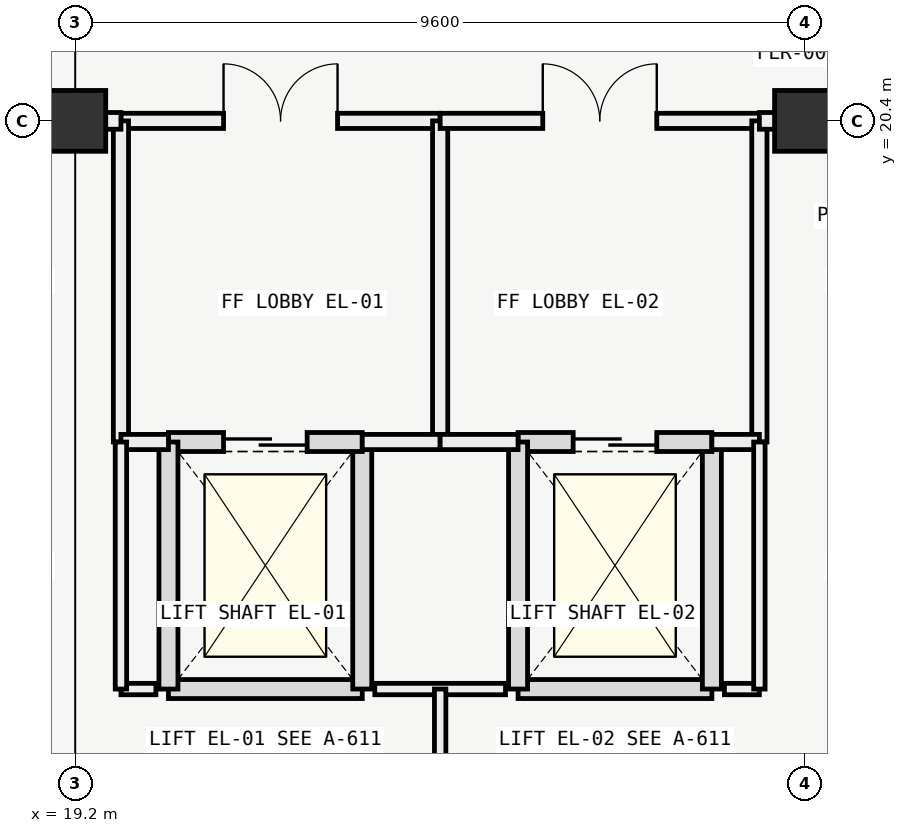
"""IFC4 building model, lengths in metres.
Left out: names, types, materials, properties, quantities, classifications, styles, units other than length and angle.
Written with IfcOpenShell. Run it as: python <this file> out.ifc"""

import sys

from ifc_helpers import new_model, si_unit, direction, frame, frame_2d, origin, origin_2d, place, context, subcontext, project, spatial, rectangle, extrude, element, fill, save


model = new_model("IFC4")
c1 = context("Model", 3, precision=1e-05, world=origin(), true_north=direction((0.0, 1.0)))
c2 = subcontext(c1, "Body", "Model", "MODEL_VIEW")
j1 = project(units=[si_unit("LENGTHUNIT", "METRE"), si_unit("PLANEANGLEUNIT", "RADIAN")], contexts=[c1])
p1 = place(None, origin())
s1 = spatial("IfcSite", under=j1, at=p1, CompositionType="ELEMENT")
p2 = place(p1, origin())
s2 = spatial("IfcBuilding", under=s1, at=p2, CompositionType="ELEMENT")
p3 = place(p2, origin())
s3 = spatial("IfcBuildingStorey", under=s2, at=p3, CompositionType="ELEMENT", Elevation=0.0)
for number, where, z_axis, x_axis in (
    (1, (19.2, 20.4, 0.0), (0.0, 0.0, 1.0), (1.0, 0.0, 0.0)),
    (2, (28.8, 20.4, 0.0), (0.0, 0.0, 1.0), (1.0, 0.0, 0.0)),
):
    element("IfcColumn", number, at=place(p3, frame(where, z_axis=z_axis, x_axis=x_axis)), inside=s3, PredefinedType="COLUMN", context=c2, shape_type="SweptSolid", body=[
        extrude(rectangle(XDim=0.8, YDim=0.8, at=origin_2d()), origin(), (0.0, 0.0, 1.0), 5.4),
    ])
p4 = place(p3, frame((20.425, 12.925, 0.0), z_axis=(0.0, 0.0, 1.0), x_axis=(1.0, 0.0, 0.0)))
e3 = element("IfcWall", 3, at=p4, inside=s3, PredefinedType="SOLIDWALL", context=c2, shape_type="SweptSolid", body=[
    extrude(rectangle(XDim=2.55, YDim=0.25, at=frame_2d((1.275, 0.0))), origin(), (0.0, 0.0, 1.0), 5.12),
])
p5 = place(p3, frame((22.975, 12.925, 0.0), z_axis=(0.0, 0.0, 1.0), x_axis=(0.0, 1.0, 0.0)))
e4 = element("IfcWall", 4, at=p5, inside=s3, PredefinedType="SOLIDWALL", context=c2, shape_type="SweptSolid", body=[
    extrude(rectangle(XDim=3.25, YDim=0.25, at=frame_2d((1.625, 0.0))), origin(), (0.0, 0.0, 1.0), 5.12),
])
p6 = place(p3, frame((22.975, 16.175, 0.0), z_axis=(0.0, 0.0, 1.0), x_axis=(-1.0, 0.0, 0.0)))
e5 = element("IfcWall", 5, at=p6, inside=s3, PredefinedType="SOLIDWALL", context=c2, shape_type="SweptSolid", body=[
    extrude(rectangle(XDim=2.55, YDim=0.25, at=frame_2d((1.275, 0.0))), origin(), (0.0, 0.0, 1.0), 5.12),
])
p7 = place(p6, frame((0.725, 0.0, 0.0)))
e6 = element("IfcOpeningElement", 6, at=p7, cuts=e5, PredefinedType="OPENING", context=c2, shape_type="SweptSolid", body=[
    extrude(rectangle(XDim=1.1, YDim=2.1, at=frame_2d((0.55, 1.05))), frame((0.0, 0.135, 0.0), z_axis=(0.0, -1.0, 0.0), x_axis=(1.0, 0.0, 0.0)), (0.0, 0.0, 1.0), 0.27),
])
p8 = place(p3, frame((20.425, 16.175, 0.0), z_axis=(0.0, 0.0, 1.0), x_axis=(0.0, -1.0, 0.0)))
e7 = element("IfcWall", 7, at=p8, inside=s3, PredefinedType="SOLIDWALL", context=c2, shape_type="SweptSolid", body=[
    extrude(rectangle(XDim=3.25, YDim=0.25, at=frame_2d((1.625, 0.0))), origin(), (0.0, 0.0, 1.0), 5.12),
])
p9 = place(p3, frame((19.8, 20.4, 0.0), z_axis=(0.0, 0.0, 1.0), x_axis=(1.0, 0.0, 0.0)))
e8 = element("IfcWall", 8, at=p9, inside=s3, PredefinedType="PARTITIONING", context=c2, shape_type="SweptSolid", body=[
    extrude(rectangle(XDim=4.2, YDim=0.2, at=frame_2d((2.1, 0.0))), origin(), (0.0, 0.0, 1.0), 4.4),
])
p10 = place(p9, frame((1.35, 0.0, 0.0)))
e9 = element("IfcOpeningElement", 9, at=p10, cuts=e8, PredefinedType="OPENING", context=c2, shape_type="SweptSolid", body=[
    extrude(rectangle(XDim=1.5, YDim=2.2, at=frame_2d((0.75, 1.1))), frame((0.0, 0.11, 0.0), z_axis=(0.0, -1.0, 0.0), x_axis=(1.0, 0.0, 0.0)), (0.0, 0.0, 1.0), 0.22),
])
for number, where, z_axis, x_axis in (
    (10, (19.8, 16.175, 0.0), (0.0, 0.0, 1.0), (0.0, 1.0, 0.0)),
    (11, (24.0, 16.175, 0.0), (0.0, 0.0, 1.0), (0.0, 1.0, 0.0)),
):
    element("IfcWall", number, at=place(p3, frame(where, z_axis=z_axis, x_axis=x_axis)), inside=s3, PredefinedType="PARTITIONING", context=c2, shape_type="SweptSolid", body=[
        extrude(rectangle(XDim=4.225, YDim=0.2, at=frame_2d((2.112, 0.0))), origin(), (0.0, 0.0, 1.0), 4.4),
    ])
p11 = place(p3, frame((19.8, 16.175, 0.0), z_axis=(0.0, 0.0, 1.0), x_axis=(1.0, 0.0, 0.0)))
e12 = element("IfcWall", 12, at=p11, inside=s3, PredefinedType="PARTITIONING", context=c2, shape_type="SweptSolid", body=[
    extrude(rectangle(XDim=0.625, YDim=0.2, at=frame_2d((0.312, 0.0))), origin(), (0.0, 0.0, 1.0), 4.75),
])
p12 = place(p3, frame((22.975, 16.175, 0.0), z_axis=(0.0, 0.0, 1.0), x_axis=(1.0, 0.0, 0.0)))
e13 = element("IfcWall", 13, at=p12, inside=s3, PredefinedType="PARTITIONING", context=c2, shape_type="SweptSolid", body=[
    extrude(rectangle(XDim=1.025, YDim=0.2, at=frame_2d((0.512, 0.0))), origin(), (0.0, 0.0, 1.0), 4.75),
])
p13 = place(p3, frame((25.025, 12.925, 0.0), z_axis=(0.0, 0.0, 1.0), x_axis=(1.0, 0.0, 0.0)))
e14 = element("IfcWall", 14, at=p13, inside=s3, PredefinedType="SOLIDWALL", context=c2, shape_type="SweptSolid", body=[
    extrude(rectangle(XDim=2.55, YDim=0.25, at=frame_2d((1.275, 0.0))), origin(), (0.0, 0.0, 1.0), 5.12),
])
p14 = place(p3, frame((27.575, 12.925, 0.0), z_axis=(0.0, 0.0, 1.0), x_axis=(0.0, 1.0, 0.0)))
e15 = element("IfcWall", 15, at=p14, inside=s3, PredefinedType="SOLIDWALL", context=c2, shape_type="SweptSolid", body=[
    extrude(rectangle(XDim=3.25, YDim=0.25, at=frame_2d((1.625, 0.0))), origin(), (0.0, 0.0, 1.0), 5.12),
])
p15 = place(p3, frame((27.575, 16.175, 0.0), z_axis=(0.0, 0.0, 1.0), x_axis=(-1.0, 0.0, 0.0)))
e16 = element("IfcWall", 16, at=p15, inside=s3, PredefinedType="SOLIDWALL", context=c2, shape_type="SweptSolid", body=[
    extrude(rectangle(XDim=2.55, YDim=0.25, at=frame_2d((1.275, 0.0))), origin(), (0.0, 0.0, 1.0), 5.12),
])
p16 = place(p15, frame((0.725, 0.0, 0.0)))
e17 = element("IfcOpeningElement", 17, at=p16, cuts=e16, PredefinedType="OPENING", context=c2, shape_type="SweptSolid", body=[
    extrude(rectangle(XDim=1.1, YDim=2.1, at=frame_2d((0.55, 1.05))), frame((0.0, 0.135, 0.0), z_axis=(0.0, -1.0, 0.0), x_axis=(1.0, 0.0, 0.0)), (0.0, 0.0, 1.0), 0.27),
])
p17 = place(p3, frame((25.025, 16.175, 0.0), z_axis=(0.0, 0.0, 1.0), x_axis=(0.0, -1.0, 0.0)))
e18 = element("IfcWall", 18, at=p17, inside=s3, PredefinedType="SOLIDWALL", context=c2, shape_type="SweptSolid", body=[
    extrude(rectangle(XDim=3.25, YDim=0.25, at=frame_2d((1.625, 0.0))), origin(), (0.0, 0.0, 1.0), 5.12),
])
p18 = place(p3, frame((24.0, 20.4, 0.0), z_axis=(0.0, 0.0, 1.0), x_axis=(1.0, 0.0, 0.0)))
e19 = element("IfcWall", 19, at=p18, inside=s3, PredefinedType="PARTITIONING", context=c2, shape_type="SweptSolid", body=[
    extrude(rectangle(XDim=4.2, YDim=0.2, at=frame_2d((2.1, 0.0))), origin(), (0.0, 0.0, 1.0), 4.4),
])
p19 = place(p18, frame((1.35, 0.0, 0.0)))
e20 = element("IfcOpeningElement", 20, at=p19, cuts=e19, PredefinedType="OPENING", context=c2, shape_type="SweptSolid", body=[
    extrude(rectangle(XDim=1.5, YDim=2.2, at=frame_2d((0.75, 1.1))), frame((0.0, 0.11, 0.0), z_axis=(0.0, -1.0, 0.0), x_axis=(1.0, 0.0, 0.0)), (0.0, 0.0, 1.0), 0.22),
])
p20 = place(p3, frame((28.2, 16.175, 0.0), z_axis=(0.0, 0.0, 1.0), x_axis=(0.0, 1.0, 0.0)))
e21 = element("IfcWall", 21, at=p20, inside=s3, PredefinedType="PARTITIONING", context=c2, shape_type="SweptSolid", body=[
    extrude(rectangle(XDim=4.225, YDim=0.2, at=frame_2d((2.112, 0.0))), origin(), (0.0, 0.0, 1.0), 4.4),
])
p21 = place(p3, frame((24.0, 16.175, 0.0), z_axis=(0.0, 0.0, 1.0), x_axis=(1.0, 0.0, 0.0)))
e22 = element("IfcWall", 22, at=p21, inside=s3, PredefinedType="PARTITIONING", context=c2, shape_type="SweptSolid", body=[
    extrude(rectangle(XDim=1.025, YDim=0.2, at=frame_2d((0.512, 0.0))), origin(), (0.0, 0.0, 1.0), 4.75),
])
p22 = place(p3, frame((27.575, 16.175, 0.0), z_axis=(0.0, 0.0, 1.0), x_axis=(1.0, 0.0, 0.0)))
e23 = element("IfcWall", 23, at=p22, inside=s3, PredefinedType="PARTITIONING", context=c2, shape_type="SweptSolid", body=[
    extrude(rectangle(XDim=0.625, YDim=0.2, at=frame_2d((0.312, 0.0))), origin(), (0.0, 0.0, 1.0), 4.75),
])
p23 = place(p3, frame((19.8, 12.925, 0.0), z_axis=(0.0, 0.0, 1.0), x_axis=(1.0, 0.0, 0.0)))
e24 = element("IfcWall", 24, at=p23, inside=s3, PredefinedType="PARTITIONING", context=c2, shape_type="SweptSolid", body=[
    extrude(rectangle(XDim=0.46, YDim=0.15, at=frame_2d((0.23, 0.0))), origin(), (0.0, 0.0, 1.0), 5.05),
])
p24 = place(p3, frame((23.14, 12.925, 0.0), z_axis=(0.0, 0.0, 1.0), x_axis=(1.0, 0.0, 0.0)))
e25 = element("IfcWall", 25, at=p24, inside=s3, PredefinedType="PARTITIONING", context=c2, shape_type="SweptSolid", body=[
    extrude(rectangle(XDim=1.72, YDim=0.15, at=frame_2d((0.86, 0.0))), origin(), (0.0, 0.0, 1.0), 5.05),
])
p25 = place(p3, frame((27.74, 12.925, 0.0), z_axis=(0.0, 0.0, 1.0), x_axis=(1.0, 0.0, 0.0)))
e26 = element("IfcWall", 26, at=p25, inside=s3, PredefinedType="PARTITIONING", context=c2, shape_type="SweptSolid", body=[
    extrude(rectangle(XDim=0.46, YDim=0.15, at=frame_2d((0.23, 0.0))), origin(), (0.0, 0.0, 1.0), 5.05),
])
p26 = place(p3, frame((19.8, 12.925, 0.0), z_axis=(0.0, 0.0, 1.0), x_axis=(0.0, 1.0, 0.0)))
e27 = element("IfcWall", 27, at=p26, inside=s3, PredefinedType="PARTITIONING", context=c2, shape_type="SweptSolid", body=[
    extrude(rectangle(XDim=3.25, YDim=0.15, at=frame_2d((1.625, 0.0))), origin(), (0.0, 0.0, 1.0), 5.05),
])
p27 = place(p3, frame((16.89, 20.4, 0.0), z_axis=(0.0, 0.0, 1.0), x_axis=(1.0, 0.0, 0.0)))
e28 = element("IfcWall", 28, at=p27, inside=s3, PredefinedType="PARTITIONING", context=c2, shape_type="SweptSolid", body=[
    extrude(rectangle(XDim=2.91, YDim=0.22, at=frame_2d((1.455, 0.0))), origin(), (0.0, 0.0, 1.0), 4.4),
])
p28 = place(p27, frame((0.885, 0.0, 0.0)))
e29 = element("IfcOpeningElement", 29, at=p28, cuts=e28, PredefinedType="OPENING", context=c2, shape_type="SweptSolid", body=[
    extrude(rectangle(XDim=0.95, YDim=2.1, at=frame_2d((0.475, 1.05))), frame((0.0, 0.12, 0.0), z_axis=(0.0, -1.0, 0.0), x_axis=(1.0, 0.0, 0.0)), (0.0, 0.0, 1.0), 0.24),
])
p29 = place(p3, frame((24.0, 0.15, 0.0), z_axis=(0.0, 0.0, 1.0), x_axis=(0.0, 1.0, 0.0)))
e30 = element("IfcWall", 30, at=p29, inside=s3, PredefinedType="PARTITIONING", context=c2, shape_type="SweptSolid", body=[
    extrude(rectangle(XDim=12.775, YDim=0.15, at=frame_2d((6.388, 0.0))), origin(), (0.0, 0.0, 1.0), 4.4),
])
p30 = place(p3, frame((28.2, 12.925, 0.0), z_axis=(0.0, 0.0, 1.0), x_axis=(0.0, 1.0, 0.0)))
e31 = element("IfcWall", 31, at=p30, inside=s3, PredefinedType="PARTITIONING", context=c2, shape_type="SweptSolid", body=[
    extrude(rectangle(XDim=3.25, YDim=0.15, at=frame_2d((1.625, 0.0))), origin(), (0.0, 0.0, 1.0), 5.05),
])
p31 = place(p3, frame((28.2, 20.4, 0.0), z_axis=(0.0, 0.0, 1.0), x_axis=(1.0, 0.0, 0.0)))
e32 = element("IfcWall", 32, at=p31, inside=s3, PredefinedType="PARTITIONING", context=c2, shape_type="SweptSolid", body=[
    extrude(rectangle(XDim=3.11, YDim=0.22, at=frame_2d((1.555, 0.0))), origin(), (0.0, 0.0, 1.0), 4.4),
])
p32 = place(p31, frame((2.0, 0.0, 0.0)))
e33 = element("IfcOpeningElement", 33, at=p32, cuts=e32, PredefinedType="OPENING", context=c2, shape_type="SweptSolid", body=[
    extrude(rectangle(XDim=0.95, YDim=2.1, at=frame_2d((0.475, 1.05))), frame((0.0, 0.12, 0.0), z_axis=(0.0, -1.0, 0.0), x_axis=(1.0, 0.0, 0.0)), (0.0, 0.0, 1.0), 0.24),
])
p33 = place(p7, origin())
e34 = element("IfcDoor", 34, at=p33, inside=s3, OperationType="SLIDING_TO_LEFT", PredefinedType="DOOR", context=c2, shape_type="SweptSolid", body=[
    extrude(rectangle(XDim=1.1, YDim=2.1, at=frame_2d((0.55, 1.05))), frame((0.0, 0.025, 0.0), z_axis=(0.0, -1.0, 0.0), x_axis=(1.0, 0.0, 0.0)), (0.0, 0.0, 1.0), 0.05),
])
fill(e6, e34)
p34 = place(p10, origin())
e35 = element("IfcDoor", 35, at=p34, inside=s3, OperationType="SINGLE_SWING_LEFT", PredefinedType="DOOR", context=c2, shape_type="SweptSolid", body=[
    extrude(rectangle(XDim=1.5, YDim=2.2, at=frame_2d((0.75, 1.1))), frame((0.0, 0.025, 0.0), z_axis=(0.0, -1.0, 0.0), x_axis=(1.0, 0.0, 0.0)), (0.0, 0.0, 1.0), 0.05),
])
fill(e9, e35)
p35 = place(p16, origin())
e36 = element("IfcDoor", 36, at=p35, inside=s3, OperationType="SLIDING_TO_LEFT", PredefinedType="DOOR", context=c2, shape_type="SweptSolid", body=[
    extrude(rectangle(XDim=1.1, YDim=2.1, at=frame_2d((0.55, 1.05))), frame((0.0, 0.025, 0.0), z_axis=(0.0, -1.0, 0.0), x_axis=(1.0, 0.0, 0.0)), (0.0, 0.0, 1.0), 0.05),
])
fill(e17, e36)
p36 = place(p19, origin())
e37 = element("IfcDoor", 37, at=p36, inside=s3, OperationType="SINGLE_SWING_LEFT", PredefinedType="DOOR", context=c2, shape_type="SweptSolid", body=[
    extrude(rectangle(XDim=1.5, YDim=2.2, at=frame_2d((0.75, 1.1))), frame((0.0, 0.025, 0.0), z_axis=(0.0, -1.0, 0.0), x_axis=(1.0, 0.0, 0.0)), (0.0, 0.0, 1.0), 0.05),
])
fill(e20, e37)
save(model, sys.argv[1])
